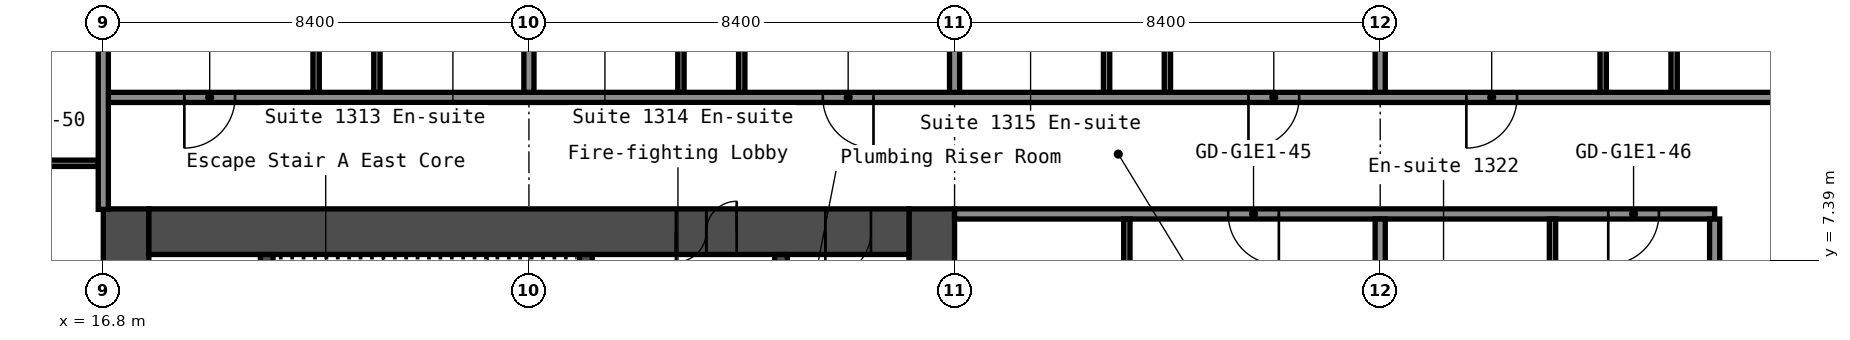
"""IFC4 building model, lengths in metres.
Left out: names, types, materials, properties, quantities, classifications, styles, units other than length and angle.
Written with IfcOpenShell. Run it as: python <this file> out.ifc"""

import sys

from ifc_helpers import new_model, si_unit, direction, frame, frame_2d, origin, place, context, subcontext, project, spatial, rectangle, extrude, element, fill, save


model = new_model("IFC4")
c1 = context("Model", 3, precision=1e-05, world=origin(), true_north=direction((0.0, 1.0)))
c2 = subcontext(c1, "Body", "Model", "MODEL_VIEW")
j1 = project(units=[si_unit("LENGTHUNIT", "METRE"), si_unit("PLANEANGLEUNIT", "RADIAN")], contexts=[c1])
p1 = place(None, origin())
s1 = spatial("IfcSite", under=j1, at=p1, CompositionType="ELEMENT")
p2 = place(p1, origin())
s2 = spatial("IfcBuilding", under=s1, at=p2, CompositionType="ELEMENT")
p3 = place(p2, frame((0.0, 0.0, 48.6)))
s3 = spatial("IfcBuildingStorey", under=s2, at=p3, CompositionType="ELEMENT", Elevation=48.6)
p4 = place(p3, frame((17.25, -8.4, 0.0), z_axis=(0.0, 0.0, 1.0), x_axis=(0.0, 1.0, 0.0)))
e1 = element("IfcWall", 1, at=p4, inside=s3, PredefinedType="SHEAR", context=c2, shape_type="SweptSolid", body=[
    extrude(rectangle(XDim=16.8, YDim=0.9, at=frame_2d((8.4, 0.0))), origin(), (0.0, 0.0, 1.0), 2.8),
])
p5 = place(p4, frame((12.75, 0.0, 0.0)))
e2 = element("IfcOpeningElement", 2, at=p5, cuts=e1, PredefinedType="OPENING", context=c2, shape_type="SweptSolid", body=[
    extrude(rectangle(XDim=1.2, YDim=2.1, at=frame_2d((0.6, 1.05))), frame((0.0, 0.46, 0.0), z_axis=(0.0, -1.0, 0.0), x_axis=(1.0, 0.0, 0.0)), (0.0, 0.0, 1.0), 0.92),
])
p6 = place(p4, frame((2.85, 0.0, 0.0)))
e3 = element("IfcOpeningElement", 3, at=p6, cuts=e1, PredefinedType="OPENING", context=c2, shape_type="SweptSolid", body=[
    extrude(rectangle(XDim=1.2, YDim=2.1, at=frame_2d((0.6, 1.05))), frame((0.0, 0.46, 0.0), z_axis=(0.0, -1.0, 0.0), x_axis=(1.0, 0.0, 0.0)), (0.0, 0.0, 1.0), 0.92),
])
p7 = place(p3, frame((33.15, -8.4, 0.0), z_axis=(0.0, 0.0, 1.0), x_axis=(0.0, 1.0, 0.0)))
e4 = element("IfcWall", 4, at=p7, inside=s3, PredefinedType="SHEAR", context=c2, shape_type="SweptSolid", body=[
    extrude(rectangle(XDim=16.8, YDim=0.9, at=frame_2d((8.4, 0.0))), origin(), (0.0, 0.0, 1.0), 2.8),
])
p8 = place(p3, frame((17.7, 7.95, 0.0), z_axis=(0.0, 0.0, 1.0), x_axis=(1.0, 0.0, 0.0)))
e5 = element("IfcWall", 5, at=p8, inside=s3, PredefinedType="SHEAR", context=c2, shape_type="SweptSolid", body=[
    extrude(rectangle(XDim=15.0, YDim=0.9, at=frame_2d((7.5, 0.0))), origin(), (0.0, 0.0, 1.0), 2.8),
])
p9 = place(p8, frame((10.4, 0.0, 0.0)))
e6 = element("IfcOpeningElement", 6, at=p9, cuts=e5, PredefinedType="OPENING", context=c2, shape_type="SweptSolid", body=[
    extrude(rectangle(XDim=1.2, YDim=2.1, at=frame_2d((0.6, 1.05))), frame((0.0, 0.46, 0.0), z_axis=(0.0, -1.0, 0.0), x_axis=(1.0, 0.0, 0.0)), (0.0, 0.0, 1.0), 0.92),
])
p10 = place(p8, frame((13.35, 0.0, 0.0)))
e7 = element("IfcOpeningElement", 7, at=p10, cuts=e5, PredefinedType="OPENING", context=c2, shape_type="SweptSolid", body=[
    extrude(rectangle(XDim=0.9, YDim=2.1, at=frame_2d((0.45, 1.05))), frame((0.0, 0.46, 0.0), z_axis=(0.0, -1.0, 0.0), x_axis=(1.0, 0.0, 0.0)), (0.0, 0.0, 1.0), 0.92),
])
p11 = place(p3, frame((20.025, 1.2, 0.0), z_axis=(0.0, 0.0, 1.0), x_axis=(0.0, 1.0, 0.0)))
e8 = element("IfcWall", 8, at=p11, inside=s3, PredefinedType="SHEAR", context=c2, shape_type="SweptSolid", body=[
    extrude(rectangle(XDim=6.3, YDim=0.25, at=frame_2d((3.15, 0.0))), origin(), (0.0, 0.0, 1.0), 2.8),
])
p12 = place(p3, frame((26.325, 3.75, 0.0), z_axis=(0.0, 0.0, 1.0), x_axis=(0.0, 1.0, 0.0)))
e9 = element("IfcWall", 9, at=p12, inside=s3, PredefinedType="SHEAR", context=c2, shape_type="SweptSolid", body=[
    extrude(rectangle(XDim=3.75, YDim=0.25, at=frame_2d((1.875, 0.0))), origin(), (0.0, 0.0, 1.0), 2.8),
])
p13 = place(p12, frame((1.25, 0.0, 0.0)))
e10 = element("IfcOpeningElement", 10, at=p13, cuts=e9, PredefinedType="OPENING", context=c2, shape_type="SweptSolid", body=[
    extrude(rectangle(XDim=1.2, YDim=2.1, at=frame_2d((0.6, 1.05))), frame((0.0, 0.135, 0.0), z_axis=(0.0, -1.0, 0.0), x_axis=(1.0, 0.0, 0.0)), (0.0, 0.0, 1.0), 0.27),
])
p14 = place(p3, frame((30.175, 1.45, 0.0), z_axis=(0.0, 0.0, 1.0), x_axis=(0.0, 1.0, 0.0)))
e11 = element("IfcWall", 11, at=p14, inside=s3, PredefinedType="SHEAR", context=c2, shape_type="SweptSolid", body=[
    extrude(rectangle(XDim=6.05, YDim=0.25, at=frame_2d((3.025, 0.0))), origin(), (0.0, 0.0, 1.0), 2.8),
])
p15 = place(p14, frame((2.625, 0.0, 0.0)))
e12 = element("IfcOpeningElement", 12, at=p15, cuts=e11, PredefinedType="OPENING", context=c2, shape_type="SweptSolid", body=[
    extrude(rectangle(XDim=1.1, YDim=2.1, at=frame_2d((0.55, 1.05))), frame((0.0, 0.135, 0.0), z_axis=(0.0, -1.0, 0.0), x_axis=(1.0, 0.0, 0.0)), (0.0, 0.0, 1.0), 0.27),
])
p16 = place(p3, frame((33.6, 8.3, 0.0), z_axis=(0.0, 0.0, 1.0), x_axis=(1.0, 0.0, 0.0)))
e13 = element("IfcWall", 13, at=p16, inside=s3, PredefinedType="PARTITIONING", context=c2, shape_type="SweptSolid", body=[
    extrude(rectangle(XDim=15.0, YDim=0.2, at=frame_2d((7.5, 0.0))), origin(), (0.0, 0.0, 1.0), 2.8),
])
p17 = place(p16, frame((5.4, 0.0, 0.0)))
e14 = element("IfcOpeningElement", 14, at=p17, cuts=e13, PredefinedType="OPENING", context=c2, shape_type="SweptSolid", body=[
    extrude(rectangle(XDim=1.0, YDim=2.1, at=frame_2d((0.5, 1.05))), frame((0.0, 0.11, 0.0), z_axis=(0.0, -1.0, 0.0), x_axis=(1.0, 0.0, 0.0)), (0.0, 0.0, 1.0), 0.22),
])
p18 = place(p16, frame((12.9, 0.0, 0.0)))
e15 = element("IfcOpeningElement", 15, at=p18, cuts=e13, PredefinedType="OPENING", context=c2, shape_type="SweptSolid", body=[
    extrude(rectangle(XDim=1.0, YDim=2.1, at=frame_2d((0.5, 1.05))), frame((0.0, 0.11, 0.0), z_axis=(0.0, -1.0, 0.0), x_axis=(1.0, 0.0, 0.0)), (0.0, 0.0, 1.0), 0.22),
])
p19 = place(p3, frame((13.863, 9.3, 0.0), z_axis=(0.0, 0.0, 1.0), x_axis=(1.0, 0.0, 0.0)))
e16 = element("IfcWall", 16, at=p19, inside=s3, PredefinedType="PARTITIONING", context=c2, shape_type="SweptSolid", body=[
    extrude(rectangle(XDim=2.837, YDim=0.125, at=frame_2d((1.419, 0.0))), origin(), (0.0, 0.0, 1.0), 2.8),
])
p20 = place(p19, frame((1.038, 0.0, 0.0)))
e17 = element("IfcOpeningElement", 17, at=p20, cuts=e16, PredefinedType="OPENING", context=c2, shape_type="SweptSolid", body=[
    extrude(rectangle(XDim=0.8, YDim=2.1, at=frame_2d((0.4, 1.05))), frame((0.0, 0.073, 0.0), z_axis=(0.0, -1.0, 0.0), x_axis=(1.0, 0.0, 0.0)), (0.0, 0.0, 1.0), 0.145),
])
p21 = place(p3, frame((16.8, 10.6, 0.0), z_axis=(0.0, 0.0, 1.0), x_axis=(1.0, 0.0, 0.0)))
e18 = element("IfcWall", 18, at=p21, inside=s3, PredefinedType="PARTITIONING", context=c2, shape_type="SweptSolid", body=[
    extrude(rectangle(XDim=34.3, YDim=0.2, at=frame_2d((17.15, 0.0))), origin(), (0.0, 0.0, 1.0), 2.8),
])
p22 = place(p21, frame((1.6, 0.0, 0.0)))
e19 = element("IfcOpeningElement", 19, at=p22, cuts=e18, PredefinedType="OPENING", context=c2, shape_type="SweptSolid", body=[
    extrude(rectangle(XDim=1.0, YDim=2.1, at=frame_2d((0.5, 1.05))), frame((0.0, 0.11, 0.0), z_axis=(0.0, -1.0, 0.0), x_axis=(1.0, 0.0, 0.0)), (0.0, 0.0, 1.0), 0.22),
])
p23 = place(p21, frame((14.2, 0.0, 0.0)))
e20 = element("IfcOpeningElement", 20, at=p23, cuts=e18, PredefinedType="OPENING", context=c2, shape_type="SweptSolid", body=[
    extrude(rectangle(XDim=1.0, YDim=2.1, at=frame_2d((0.5, 1.05))), frame((0.0, 0.11, 0.0), z_axis=(0.0, -1.0, 0.0), x_axis=(1.0, 0.0, 0.0)), (0.0, 0.0, 1.0), 0.22),
])
p24 = place(p21, frame((22.6, 0.0, 0.0)))
e21 = element("IfcOpeningElement", 21, at=p24, cuts=e18, PredefinedType="OPENING", context=c2, shape_type="SweptSolid", body=[
    extrude(rectangle(XDim=1.0, YDim=2.1, at=frame_2d((0.5, 1.05))), frame((0.0, 0.11, 0.0), z_axis=(0.0, -1.0, 0.0), x_axis=(1.0, 0.0, 0.0)), (0.0, 0.0, 1.0), 0.22),
])
p25 = place(p21, frame((26.9, 0.0, 0.0)))
e22 = element("IfcOpeningElement", 22, at=p25, cuts=e18, PredefinedType="OPENING", context=c2, shape_type="SweptSolid", body=[
    extrude(rectangle(XDim=1.0, YDim=2.1, at=frame_2d((0.5, 1.05))), frame((0.0, 0.11, 0.0), z_axis=(0.0, -1.0, 0.0), x_axis=(1.0, 0.0, 0.0)), (0.0, 0.0, 1.0), 0.22),
])
p26 = place(p3, frame((16.8, 8.39, 0.0), z_axis=(0.0, 0.0, 1.0), x_axis=(0.0, 1.0, 0.0)))
e23 = element("IfcWall", 23, at=p26, inside=s3, PredefinedType="PARTITIONING", context=c2, shape_type="SweptSolid", body=[
    extrude(rectangle(XDim=11.91, YDim=0.2, at=frame_2d((5.955, 0.0))), origin(), (0.0, 0.0, 1.0), 2.8),
])
p27 = place(p3, frame((21.0, 10.7, 0.0), z_axis=(0.0, 0.0, 1.0), x_axis=(0.0, 1.0, 0.0)))
e24 = element("IfcWall", 24, at=p27, inside=s3, PredefinedType="PARTITIONING", context=c2, shape_type="SweptSolid", body=[
    extrude(rectangle(XDim=9.6, YDim=0.125, at=frame_2d((4.8, 0.0))), origin(), (0.0, 0.0, 1.0), 2.8),
])
p28 = place(p27, frame((4.05, 0.0, 0.0)))
e25 = element("IfcOpeningElement", 25, at=p28, cuts=e24, PredefinedType="OPENING", context=c2, shape_type="SweptSolid", body=[
    extrude(rectangle(XDim=0.9, YDim=2.1, at=frame_2d((0.45, 1.05))), frame((0.0, 0.073, 0.0), z_axis=(0.0, -1.0, 0.0), x_axis=(1.0, 0.0, 0.0)), (0.0, 0.0, 1.0), 0.145),
])
p29 = place(p3, frame((22.2, 10.7, 0.0), z_axis=(0.0, 0.0, 1.0), x_axis=(0.0, 1.0, 0.0)))
e26 = element("IfcWall", 26, at=p29, inside=s3, PredefinedType="PARTITIONING", context=c2, shape_type="SweptSolid", body=[
    extrude(rectangle(XDim=3.1, YDim=0.125, at=frame_2d((1.55, 0.0))), origin(), (0.0, 0.0, 1.0), 2.8),
])
p30 = place(p3, frame((25.2, 10.7, 0.0), z_axis=(0.0, 0.0, 1.0), x_axis=(0.0, 1.0, 0.0)))
e27 = element("IfcWall", 27, at=p30, inside=s3, PredefinedType="PARTITIONING", context=c2, shape_type="SweptSolid", body=[
    extrude(rectangle(XDim=9.6, YDim=0.2, at=frame_2d((4.8, 0.0))), origin(), (0.0, 0.0, 1.0), 2.8),
])
p31 = place(p3, frame((28.2, 10.7, 0.0), z_axis=(0.0, 0.0, 1.0), x_axis=(0.0, 1.0, 0.0)))
e28 = element("IfcWall", 28, at=p31, inside=s3, PredefinedType="PARTITIONING", context=c2, shape_type="SweptSolid", body=[
    extrude(rectangle(XDim=3.1, YDim=0.125, at=frame_2d((1.55, 0.0))), origin(), (0.0, 0.0, 1.0), 2.8),
])
p32 = place(p3, frame((29.4, 10.7, 0.0), z_axis=(0.0, 0.0, 1.0), x_axis=(0.0, 1.0, 0.0)))
e29 = element("IfcWall", 29, at=p32, inside=s3, PredefinedType="PARTITIONING", context=c2, shape_type="SweptSolid", body=[
    extrude(rectangle(XDim=9.6, YDim=0.125, at=frame_2d((4.8, 0.0))), origin(), (0.0, 0.0, 1.0), 2.8),
])
p33 = place(p32, frame((4.05, 0.0, 0.0)))
e30 = element("IfcOpeningElement", 30, at=p33, cuts=e29, PredefinedType="OPENING", context=c2, shape_type="SweptSolid", body=[
    extrude(rectangle(XDim=0.9, YDim=2.1, at=frame_2d((0.45, 1.05))), frame((0.0, 0.073, 0.0), z_axis=(0.0, -1.0, 0.0), x_axis=(1.0, 0.0, 0.0)), (0.0, 0.0, 1.0), 0.145),
])
p34 = place(p3, frame((33.6, 10.7, 0.0), z_axis=(0.0, 0.0, 1.0), x_axis=(0.0, 1.0, 0.0)))
e31 = element("IfcWall", 31, at=p34, inside=s3, PredefinedType="PARTITIONING", context=c2, shape_type="SweptSolid", body=[
    extrude(rectangle(XDim=9.6, YDim=0.2, at=frame_2d((4.8, 0.0))), origin(), (0.0, 0.0, 1.0), 2.8),
])
p35 = place(p3, frame((36.6, 10.7, 0.0), z_axis=(0.0, 0.0, 1.0), x_axis=(0.0, 1.0, 0.0)))
e32 = element("IfcWall", 32, at=p35, inside=s3, PredefinedType="PARTITIONING", context=c2, shape_type="SweptSolid", body=[
    extrude(rectangle(XDim=3.1, YDim=0.125, at=frame_2d((1.55, 0.0))), origin(), (0.0, 0.0, 1.0), 2.8),
])
p36 = place(p3, frame((37.0, 4.9, 0.0), z_axis=(0.0, 0.0, 1.0), x_axis=(0.0, 1.0, 0.0)))
e33 = element("IfcWall", 33, at=p36, inside=s3, PredefinedType="PARTITIONING", context=c2, shape_type="SweptSolid", body=[
    extrude(rectangle(XDim=3.3, YDim=0.125, at=frame_2d((1.65, 0.0))), origin(), (0.0, 0.0, 1.0), 2.8),
])
p37 = place(p3, frame((37.8, 10.7, 0.0), z_axis=(0.0, 0.0, 1.0), x_axis=(0.0, 1.0, 0.0)))
e34 = element("IfcWall", 34, at=p37, inside=s3, PredefinedType="PARTITIONING", context=c2, shape_type="SweptSolid", body=[
    extrude(rectangle(XDim=9.6, YDim=0.125, at=frame_2d((4.8, 0.0))), origin(), (0.0, 0.0, 1.0), 2.8),
])
p38 = place(p37, frame((4.05, 0.0, 0.0)))
e35 = element("IfcOpeningElement", 35, at=p38, cuts=e34, PredefinedType="OPENING", context=c2, shape_type="SweptSolid", body=[
    extrude(rectangle(XDim=0.9, YDim=2.1, at=frame_2d((0.45, 1.05))), frame((0.0, 0.073, 0.0), z_axis=(0.0, -1.0, 0.0), x_axis=(1.0, 0.0, 0.0)), (0.0, 0.0, 1.0), 0.145),
])
p39 = place(p3, frame((42.0, -8.2, 0.0), z_axis=(0.0, 0.0, 1.0), x_axis=(0.0, 1.0, 0.0)))
e36 = element("IfcWall", 36, at=p39, inside=s3, PredefinedType="PARTITIONING", context=c2, shape_type="SweptSolid", body=[
    extrude(rectangle(XDim=16.4, YDim=0.2, at=frame_2d((8.2, 0.0))), origin(), (0.0, 0.0, 1.0), 2.8),
])
p40 = place(p3, frame((42.0, 10.7, 0.0), z_axis=(0.0, 0.0, 1.0), x_axis=(0.0, 1.0, 0.0)))
e37 = element("IfcWall", 37, at=p40, inside=s3, PredefinedType="PARTITIONING", context=c2, shape_type="SweptSolid", body=[
    extrude(rectangle(XDim=9.6, YDim=0.2, at=frame_2d((4.8, 0.0))), origin(), (0.0, 0.0, 1.0), 2.8),
])
p41 = place(p3, frame((45.4, 4.9, 0.0), z_axis=(0.0, 0.0, 1.0), x_axis=(0.0, 1.0, 0.0)))
e38 = element("IfcWall", 38, at=p41, inside=s3, PredefinedType="PARTITIONING", context=c2, shape_type="SweptSolid", body=[
    extrude(rectangle(XDim=3.3, YDim=0.125, at=frame_2d((1.65, 0.0))), origin(), (0.0, 0.0, 1.0), 2.8),
])
p42 = place(p3, frame((46.4, 10.7, 0.0), z_axis=(0.0, 0.0, 1.0), x_axis=(0.0, 1.0, 0.0)))
e39 = element("IfcWall", 39, at=p42, inside=s3, PredefinedType="PARTITIONING", context=c2, shape_type="SweptSolid", body=[
    extrude(rectangle(XDim=9.6, YDim=0.125, at=frame_2d((4.8, 0.0))), origin(), (0.0, 0.0, 1.0), 2.8),
])
p43 = place(p42, frame((4.05, 0.0, 0.0)))
e40 = element("IfcOpeningElement", 40, at=p43, cuts=e39, PredefinedType="OPENING", context=c2, shape_type="SweptSolid", body=[
    extrude(rectangle(XDim=0.9, YDim=2.1, at=frame_2d((0.45, 1.05))), frame((0.0, 0.073, 0.0), z_axis=(0.0, -1.0, 0.0), x_axis=(1.0, 0.0, 0.0)), (0.0, 0.0, 1.0), 0.145),
])
p44 = place(p3, frame((47.8, 10.7, 0.0), z_axis=(0.0, 0.0, 1.0), x_axis=(0.0, 1.0, 0.0)))
e41 = element("IfcWall", 41, at=p44, inside=s3, PredefinedType="PARTITIONING", context=c2, shape_type="SweptSolid", body=[
    extrude(rectangle(XDim=3.1, YDim=0.125, at=frame_2d((1.55, 0.0))), origin(), (0.0, 0.0, 1.0), 2.8),
])
p45 = place(p3, frame((48.6, -8.2, 0.0), z_axis=(0.0, 0.0, 1.0), x_axis=(0.0, 1.0, 0.0)))
e42 = element("IfcWall", 42, at=p45, inside=s3, PredefinedType="PARTITIONING", context=c2, shape_type="SweptSolid", body=[
    extrude(rectangle(XDim=16.4, YDim=0.2, at=frame_2d((8.2, 0.0))), origin(), (0.0, 0.0, 1.0), 2.8),
])
p46 = place(p9, origin())
e43 = element("IfcDoor", 43, at=p46, inside=s3, OperationType="DOUBLE_DOOR_SINGLE_SWING", PredefinedType="DOOR", context=c2, shape_type="SweptSolid", body=[
    extrude(rectangle(XDim=1.2, YDim=2.1, at=frame_2d((0.6, 1.05))), frame((0.0, 0.025, 0.0), z_axis=(0.0, -1.0, 0.0), x_axis=(1.0, 0.0, 0.0)), (0.0, 0.0, 1.0), 0.05),
])
fill(e6, e43)
p47 = place(p10, origin())
e44 = element("IfcDoor", 44, at=p47, inside=s3, OperationType="SINGLE_SWING_LEFT", PredefinedType="DOOR", context=c2, shape_type="SweptSolid", body=[
    extrude(rectangle(XDim=0.9, YDim=2.1, at=frame_2d((0.45, 1.05))), frame((0.0, 0.025, 0.0), z_axis=(0.0, -1.0, 0.0), x_axis=(1.0, 0.0, 0.0)), (0.0, 0.0, 1.0), 0.05),
])
fill(e7, e44)
p48 = place(p17, origin())
e45 = element("IfcDoor", 45, at=p48, inside=s3, OperationType="SINGLE_SWING_RIGHT", PredefinedType="DOOR", context=c2, shape_type="SweptSolid", body=[
    extrude(rectangle(XDim=1.0, YDim=2.1, at=frame_2d((0.5, 1.05))), frame((0.0, 0.025, 0.0), z_axis=(0.0, -1.0, 0.0), x_axis=(1.0, 0.0, 0.0)), (0.0, 0.0, 1.0), 0.05),
])
fill(e14, e45)
p49 = place(p18, origin())
e46 = element("IfcDoor", 46, at=p49, inside=s3, OperationType="SINGLE_SWING_LEFT", PredefinedType="DOOR", context=c2, shape_type="SweptSolid", body=[
    extrude(rectangle(XDim=1.0, YDim=2.1, at=frame_2d((0.5, 1.05))), frame((0.0, 0.025, 0.0), z_axis=(0.0, -1.0, 0.0), x_axis=(1.0, 0.0, 0.0)), (0.0, 0.0, 1.0), 0.05),
])
fill(e15, e46)
p50 = place(p22, origin())
e47 = element("IfcDoor", 47, at=p50, inside=s3, OperationType="SINGLE_SWING_LEFT", PredefinedType="DOOR", context=c2, shape_type="SweptSolid", body=[
    extrude(rectangle(XDim=1.0, YDim=2.1, at=frame_2d((0.5, 1.05))), frame((0.0, 0.025, 0.0), z_axis=(0.0, -1.0, 0.0), x_axis=(1.0, 0.0, 0.0)), (0.0, 0.0, 1.0), 0.05),
])
fill(e19, e47)
p51 = place(p23, origin())
e48 = element("IfcDoor", 48, at=p51, inside=s3, OperationType="SINGLE_SWING_RIGHT", PredefinedType="DOOR", context=c2, shape_type="SweptSolid", body=[
    extrude(rectangle(XDim=1.0, YDim=2.1, at=frame_2d((0.5, 1.05))), frame((0.0, 0.025, 0.0), z_axis=(0.0, -1.0, 0.0), x_axis=(1.0, 0.0, 0.0)), (0.0, 0.0, 1.0), 0.05),
])
fill(e20, e48)
p52 = place(p24, origin())
e49 = element("IfcDoor", 49, at=p52, inside=s3, OperationType="SINGLE_SWING_LEFT", PredefinedType="DOOR", context=c2, shape_type="SweptSolid", body=[
    extrude(rectangle(XDim=1.0, YDim=2.1, at=frame_2d((0.5, 1.05))), frame((0.0, 0.025, 0.0), z_axis=(0.0, -1.0, 0.0), x_axis=(1.0, 0.0, 0.0)), (0.0, 0.0, 1.0), 0.05),
])
fill(e21, e49)
p53 = place(p25, origin())
e50 = element("IfcDoor", 50, at=p53, inside=s3, OperationType="SINGLE_SWING_LEFT", PredefinedType="DOOR", context=c2, shape_type="SweptSolid", body=[
    extrude(rectangle(XDim=1.0, YDim=2.1, at=frame_2d((0.5, 1.05))), frame((0.0, 0.025, 0.0), z_axis=(0.0, -1.0, 0.0), x_axis=(1.0, 0.0, 0.0)), (0.0, 0.0, 1.0), 0.05),
])
fill(e22, e50)
save(model, sys.argv[1])
